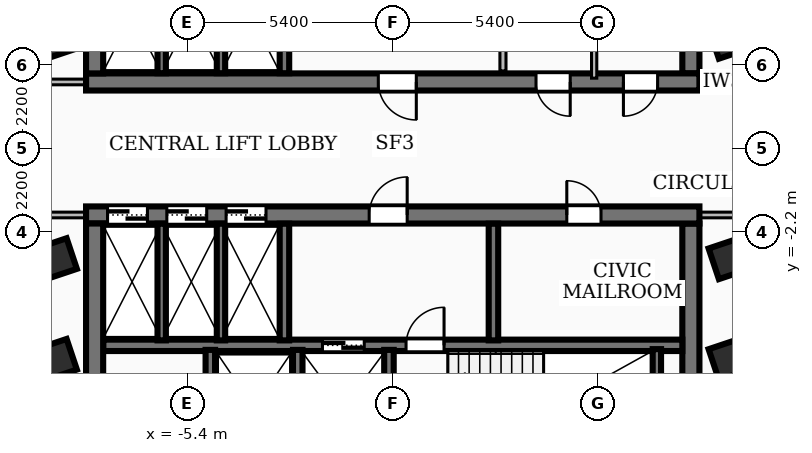
"""IFC4 building model, lengths in metres.
Left out: names, types, materials, properties, quantities, classifications, styles, units other than length and angle.
Written with IfcOpenShell. Run it as: python <this file> out.ifc"""

import sys

from ifc_helpers import new_model, si_unit, direction, frame, frame_2d, origin, origin_2d, place, context, subcontext, project, spatial, rectangle, extrude, element, fill, save


model = new_model("IFC4")
c1 = context("Model", 3, precision=1e-05, world=origin(), true_north=direction((0.0, 1.0)))
c2 = subcontext(c1, "Body", "Model", "MODEL_VIEW")
j1 = project(units=[si_unit("LENGTHUNIT", "METRE"), si_unit("PLANEANGLEUNIT", "RADIAN")], contexts=[c1])
p1 = place(None, origin())
s1 = spatial("IfcSite", under=j1, at=p1, CompositionType="ELEMENT")
p2 = place(p1, origin())
s2 = spatial("IfcBuilding", under=s1, at=p2, CompositionType="ELEMENT")
p3 = place(p2, frame((0.0, 0.0, 159.48)))
s3 = spatial("IfcBuildingStorey", under=s2, at=p3, CompositionType="ELEMENT", Elevation=159.48)
p4 = place(p3, frame((8.07, 1.75, 0.0), z_axis=(0.0, 0.0, 1.0), x_axis=(-1.0, 0.0, 0.0)))
e1 = element("IfcWall", 1, at=p4, inside=s3, PredefinedType="SHEAR", context=c2, shape_type="SweptSolid", body=[
    extrude(rectangle(XDim=16.14, YDim=0.45, at=frame_2d((8.07, 0.0))), origin(), (0.0, 0.0, 1.0), 3.34),
])
p5 = place(p4, frame((7.45, 0.0, 0.0)))
e2 = element("IfcOpeningElement", 2, at=p5, cuts=e1, PredefinedType="OPENING", context=c2, shape_type="SweptSolid", body=[
    extrude(rectangle(XDim=1.0, YDim=2.1, at=frame_2d((0.5, 1.05))), frame((0.0, 0.235, 0.0), z_axis=(0.0, -1.0, 0.0), x_axis=(1.0, 0.0, 0.0)), (0.0, 0.0, 1.0), 0.47),
])
p6 = place(p4, frame((3.4, 0.0, 0.0)))
e3 = element("IfcOpeningElement", 3, at=p6, cuts=e1, PredefinedType="OPENING", context=c2, shape_type="SweptSolid", body=[
    extrude(rectangle(XDim=0.9, YDim=2.06, at=frame_2d((0.45, 1.03))), frame((0.0, 0.235, 0.0), z_axis=(0.0, -1.0, 0.0), x_axis=(1.0, 0.0, 0.0)), (0.0, 0.0, 1.0), 0.47),
])
p7 = place(p4, frame((1.1, 0.0, 0.0)))
e4 = element("IfcOpeningElement", 4, at=p7, cuts=e1, PredefinedType="OPENING", context=c2, shape_type="SweptSolid", body=[
    extrude(rectangle(XDim=0.9, YDim=2.06, at=frame_2d((0.45, 1.03))), frame((0.0, 0.235, 0.0), z_axis=(0.0, -1.0, 0.0), x_axis=(1.0, 0.0, 0.0)), (0.0, 0.0, 1.0), 0.47),
])
for number, where, z_axis, x_axis in (
    (5, (-7.845, 1.975, 0.0), (0.0, 0.0, 1.0), (0.0, 1.0, 0.0)),
    (6, (7.845, 8.31, 0.0), (0.0, 0.0, 1.0), (0.0, -1.0, 0.0)),
):
    element("IfcWall", number, at=place(p3, frame(where, z_axis=z_axis, x_axis=x_axis)), inside=s3, PredefinedType="SHEAR", context=c2, shape_type="SweptSolid", body=[
        extrude(rectangle(XDim=6.335, YDim=0.45, at=frame_2d((3.167, 0.0))), origin(), (0.0, 0.0, 1.0), 3.34),
    ])
p8 = place(p3, frame((-8.07, -1.75, 0.0), z_axis=(0.0, 0.0, 1.0), x_axis=(1.0, 0.0, 0.0)))
e7 = element("IfcWall", 7, at=p8, inside=s3, PredefinedType="SHEAR", context=c2, shape_type="SweptSolid", body=[
    extrude(rectangle(XDim=16.14, YDim=0.45, at=frame_2d((8.07, 0.0))), origin(), (0.0, 0.0, 1.0), 3.34),
])
p9 = place(p8, frame((7.45, 0.0, 0.0)))
e8 = element("IfcOpeningElement", 8, at=p9, cuts=e7, PredefinedType="OPENING", context=c2, shape_type="SweptSolid", body=[
    extrude(rectangle(XDim=1.0, YDim=2.1, at=frame_2d((0.5, 1.05))), frame((0.0, 0.235, 0.0), z_axis=(0.0, -1.0, 0.0), x_axis=(1.0, 0.0, 0.0)), (0.0, 0.0, 1.0), 0.47),
])
p10 = place(p8, frame((12.65, 0.0, 0.0)))
e9 = element("IfcOpeningElement", 9, at=p10, cuts=e7, PredefinedType="OPENING", context=c2, shape_type="SweptSolid", body=[
    extrude(rectangle(XDim=0.9, YDim=2.06, at=frame_2d((0.45, 1.03))), frame((0.0, 0.235, 0.0), z_axis=(0.0, -1.0, 0.0), x_axis=(1.0, 0.0, 0.0)), (0.0, 0.0, 1.0), 0.47),
])
p11 = place(p8, frame((0.565, 0.0, 0.0)))
e10 = element("IfcOpeningElement", 10, at=p11, cuts=e7, PredefinedType="OPENING", context=c2, shape_type="SweptSolid", body=[
    extrude(rectangle(XDim=1.05, YDim=2.15, at=frame_2d((0.525, 1.075))), frame((0.0, 0.235, 0.0), z_axis=(0.0, -1.0, 0.0), x_axis=(1.0, 0.0, 0.0)), (0.0, 0.0, 1.0), 0.47),
])
p12 = place(p8, frame((2.125, 0.0, 0.0)))
e11 = element("IfcOpeningElement", 11, at=p12, cuts=e7, PredefinedType="OPENING", context=c2, shape_type="SweptSolid", body=[
    extrude(rectangle(XDim=1.05, YDim=2.15, at=frame_2d((0.525, 1.075))), frame((0.0, 0.235, 0.0), z_axis=(0.0, -1.0, 0.0), x_axis=(1.0, 0.0, 0.0)), (0.0, 0.0, 1.0), 0.47),
])
p13 = place(p8, frame((3.685, 0.0, 0.0)))
e12 = element("IfcOpeningElement", 12, at=p13, cuts=e7, PredefinedType="OPENING", context=c2, shape_type="SweptSolid", body=[
    extrude(rectangle(XDim=1.05, YDim=2.15, at=frame_2d((0.525, 1.075))), frame((0.0, 0.235, 0.0), z_axis=(0.0, -1.0, 0.0), x_axis=(1.0, 0.0, 0.0)), (0.0, 0.0, 1.0), 0.47),
])
for number, where, z_axis, x_axis in (
    (13, (-7.845, -8.31, 0.0), (0.0, 0.0, 1.0), (0.0, 1.0, 0.0)),
    (14, (7.845, -1.975, 0.0), (0.0, 0.0, 1.0), (0.0, -1.0, 0.0)),
):
    element("IfcWall", number, at=place(p3, frame(where, z_axis=z_axis, x_axis=x_axis)), inside=s3, PredefinedType="SHEAR", context=c2, shape_type="SweptSolid", body=[
        extrude(rectangle(XDim=6.335, YDim=0.45, at=frame_2d((3.167, 0.0))), origin(), (0.0, 0.0, 1.0), 3.34),
    ])
p14 = place(p3, frame((-7.62, -5.18, 0.0), z_axis=(0.0, 0.0, 1.0), x_axis=(1.0, 0.0, 0.0)))
e15 = element("IfcWall", 15, at=p14, inside=s3, PredefinedType="SOLIDWALL", context=c2, shape_type="SweptSolid", body=[
    extrude(rectangle(XDim=15.24, YDim=0.3, at=frame_2d((7.62, 0.0))), origin(), (0.0, 0.0, 1.0), 3.34),
])
p15 = place(p14, frame((5.77, 0.0, 0.0)))
e16 = element("IfcOpeningElement", 16, at=p15, cuts=e15, PredefinedType="OPENING", context=c2, shape_type="SweptSolid", body=[
    extrude(rectangle(XDim=1.1, YDim=2.15, at=frame_2d((0.55, 1.075))), frame((0.0, 0.16, 0.0), z_axis=(0.0, -1.0, 0.0), x_axis=(1.0, 0.0, 0.0)), (0.0, 0.0, 1.0), 0.32),
])
p16 = place(p14, frame((7.97, 0.0, 0.0)))
e17 = element("IfcOpeningElement", 17, at=p16, cuts=e15, PredefinedType="OPENING", context=c2, shape_type="SweptSolid", body=[
    extrude(rectangle(XDim=1.0, YDim=2.1, at=frame_2d((0.5, 1.05))), frame((0.0, 0.16, 0.0), z_axis=(0.0, -1.0, 0.0), x_axis=(1.0, 0.0, 0.0)), (0.0, 0.0, 1.0), 0.32),
])
p17 = place(p3, frame((6.95, -8.34, 0.0), z_axis=(0.0, 0.0, 1.0), x_axis=(0.0, 1.0, 0.0)))
e18 = element("IfcWall", 18, at=p17, inside=s3, PredefinedType="SOLIDWALL", context=c2, shape_type="SweptSolid", body=[
    extrude(rectangle(XDim=3.06, YDim=0.22, at=frame_2d((1.53, 0.0))), origin(), (0.0, 0.0, 1.0), 3.34),
])
p18 = place(p3, frame((-2.85, 1.98, 0.0), z_axis=(0.0, 0.0, 1.0), x_axis=(0.0, 1.0, 0.0)))
e19 = element("IfcWall", 19, at=p18, inside=s3, PredefinedType="SOLIDWALL", context=c2, shape_type="SweptSolid", body=[
    extrude(rectangle(XDim=3.07, YDim=0.25, at=frame_2d((1.535, 0.0))), origin(), (0.0, 0.0, 1.0), 3.34),
])
for number, where, z_axis, x_axis in (
    (20, (-0.1, -8.34, 0.0), (0.0, 0.0, 1.0), (0.0, 1.0, 0.0)),
    (21, (-2.5, -8.34, 0.0), (0.0, 0.0, 1.0), (0.0, 1.0, 0.0)),
    (22, (-4.8, -8.34, 0.0), (0.0, 0.0, 1.0), (0.0, 1.0, 0.0)),
):
    element("IfcWall", number, at=place(p3, frame(where, z_axis=z_axis, x_axis=x_axis)), inside=s3, PredefinedType="SOLIDWALL", context=c2, shape_type="SweptSolid", body=[
        extrude(rectangle(XDim=3.04, YDim=0.25, at=frame_2d((1.52, 0.0))), origin(), (0.0, 0.0, 1.0), 3.34),
    ])
for number, where, z_axis, x_axis in (
    (23, (-2.85, -5.05, 0.0), (0.0, 0.0, 1.0), (0.0, 1.0, 0.0)),
    (24, (2.65, -5.05, 0.0), (0.0, 0.0, 1.0), (0.0, 1.0, 0.0)),
):
    element("IfcWall", number, at=place(p3, frame(where, z_axis=z_axis, x_axis=x_axis)), inside=s3, PredefinedType="SOLIDWALL", context=c2, shape_type="SweptSolid", body=[
        extrude(rectangle(XDim=3.07, YDim=0.25, at=frame_2d((1.535, 0.0))), origin(), (0.0, 0.0, 1.0), 3.34),
    ])
for number, where, z_axis, x_axis in (
    (25, (-6.08, 1.98, 0.0), (0.0, 0.0, 1.0), (0.0, 1.0, 0.0)),
    (26, (-4.52, 1.98, 0.0), (0.0, 0.0, 1.0), (0.0, 1.0, 0.0)),
    (27, (-6.08, -5.05, 0.0), (0.0, 0.0, 1.0), (0.0, 1.0, 0.0)),
    (28, (-4.52, -5.05, 0.0), (0.0, 0.0, 1.0), (0.0, 1.0, 0.0)),
):
    element("IfcWall", number, at=place(p3, frame(where, z_axis=z_axis, x_axis=x_axis)), inside=s3, PredefinedType="SOLIDWALL", context=c2, shape_type="SweptSolid", body=[
        extrude(rectangle(XDim=3.07, YDim=0.22, at=frame_2d((1.535, 0.0))), origin(), (0.0, 0.0, 1.0), 3.34),
    ])
for number, where, z_axis, x_axis in (
    (29, (-8.85, -5.55, 0.0), (0.0, 0.0, 1.0), (0.948, 0.317, 0.0)),
    (30, (-8.85, -2.9, 0.0), (0.0, 0.0, 1.0), (0.948, 0.317, 0.0)),
    (31, (-8.85, 2.9, 0.0), (0.0, 0.0, 1.0), (0.948, 0.317, 0.0)),
    (32, (8.85, -5.55, 0.0), (0.0, 0.0, 1.0), (0.948, 0.317, 0.0)),
    (33, (8.85, -2.9, 0.0), (0.0, 0.0, 1.0), (0.948, 0.317, 0.0)),
    (34, (8.85, 2.9, 0.0), (0.0, 0.0, 1.0), (0.948, 0.317, 0.0)),
):
    element("IfcColumn", number, at=place(p3, frame(where, z_axis=z_axis, x_axis=x_axis)), inside=s3, PredefinedType="COLUMN", context=c2, shape_type="SweptSolid", body=[
        extrude(rectangle(XDim=0.85, YDim=0.85, at=origin_2d()), origin(), (0.0, 0.0, 1.0), 3.6),
    ])
p19 = place(p3, frame((2.9, 2.04, 0.0), z_axis=(0.0, 0.0, 1.0), x_axis=(0.0, 1.0, 0.0)))
e35 = element("IfcWall", 35, at=p19, inside=s3, PredefinedType="PARTITIONING", context=c2, shape_type="SweptSolid", body=[
    extrude(rectangle(XDim=2.94, YDim=0.16, at=frame_2d((1.47, 0.0))), origin(), (0.0, 0.0, 1.0), 2.57),
])
p20 = place(p19, frame((1.82, 0.0, 0.0)))
e36 = element("IfcOpeningElement", 36, at=p20, cuts=e35, PredefinedType="OPENING", context=c2, shape_type="SweptSolid", body=[
    extrude(rectangle(XDim=0.9, YDim=2.06, at=frame_2d((0.45, 1.03))), frame((0.0, 0.09, 0.0), z_axis=(0.0, -1.0, 0.0), x_axis=(1.0, 0.0, 0.0)), (0.0, 0.0, 1.0), 0.18),
])
p21 = place(p3, frame((5.3, 1.85, 0.0), z_axis=(0.0, 0.0, 1.0), x_axis=(0.0, 1.0, 0.0)))
e37 = element("IfcWall", 37, at=p21, inside=s3, PredefinedType="PARTITIONING", context=c2, shape_type="SweptSolid", body=[
    extrude(rectangle(XDim=1.89, YDim=0.138, at=frame_2d((0.945, 0.0))), origin(), (0.0, 0.0, 1.0), 2.57),
])
for number, where, z_axis, x_axis in (
    (38, (-7.85, 1.75, 0.0), (0.0, 0.0, 1.0), (-1.0, 0.0, 0.0)),
    (39, (-7.85, -1.75, 0.0), (0.0, 0.0, 1.0), (-1.0, 0.0, 0.0)),
    (40, (7.85, 1.75, 0.0), (0.0, 0.0, 1.0), (1.0, 0.0, 0.0)),
    (41, (7.85, -1.75, 0.0), (0.0, 0.0, 1.0), (1.0, 0.0, 0.0)),
):
    element("IfcWall", number, at=place(p3, frame(where, z_axis=z_axis, x_axis=x_axis)), inside=s3, PredefinedType="PARTITIONING", context=c2, shape_type="SweptSolid", body=[
        extrude(rectangle(XDim=1.67, YDim=0.15, at=frame_2d((0.835, 0.0))), origin(), (0.0, 0.0, 1.0), 2.57),
    ])
p22 = place(p5, origin())
e42 = element("IfcDoor", 42, at=p22, inside=s3, OperationType="SINGLE_SWING_LEFT", PredefinedType="DOOR", context=c2, shape_type="SweptSolid", body=[
    extrude(rectangle(XDim=1.0, YDim=2.1, at=frame_2d((0.5, 1.05))), frame((0.0, 0.025, 0.0), z_axis=(0.0, -1.0, 0.0), x_axis=(1.0, 0.0, 0.0)), (0.0, 0.0, 1.0), 0.05),
])
fill(e2, e42)
p23 = place(p9, origin())
e43 = element("IfcDoor", 43, at=p23, inside=s3, OperationType="SINGLE_SWING_RIGHT", PredefinedType="DOOR", context=c2, shape_type="SweptSolid", body=[
    extrude(rectangle(XDim=1.0, YDim=2.1, at=frame_2d((0.5, 1.05))), frame((0.0, 0.025, 0.0), z_axis=(0.0, -1.0, 0.0), x_axis=(1.0, 0.0, 0.0)), (0.0, 0.0, 1.0), 0.05),
])
fill(e8, e43)
p24 = place(p15, origin())
e44 = element("IfcDoor", 44, at=p24, inside=s3, OperationType="DOUBLE_DOOR_SLIDING", PredefinedType="DOOR", context=c2, shape_type="SweptSolid", body=[
    extrude(rectangle(XDim=1.1, YDim=2.15, at=frame_2d((0.55, 1.075))), frame((0.0, 0.025, 0.0), z_axis=(0.0, -1.0, 0.0), x_axis=(1.0, 0.0, 0.0)), (0.0, 0.0, 1.0), 0.05),
])
fill(e16, e44)
p25 = place(p16, origin())
e45 = element("IfcDoor", 45, at=p25, inside=s3, OperationType="SINGLE_SWING_RIGHT", PredefinedType="DOOR", context=c2, shape_type="SweptSolid", body=[
    extrude(rectangle(XDim=1.0, YDim=2.1, at=frame_2d((0.5, 1.05))), frame((0.0, 0.025, 0.0), z_axis=(0.0, -1.0, 0.0), x_axis=(1.0, 0.0, 0.0)), (0.0, 0.0, 1.0), 0.05),
])
fill(e17, e45)
p26 = place(p10, origin())
e46 = element("IfcDoor", 46, at=p26, inside=s3, OperationType="SINGLE_SWING_LEFT", PredefinedType="DOOR", context=c2, shape_type="SweptSolid", body=[
    extrude(rectangle(XDim=0.9, YDim=2.06, at=frame_2d((0.45, 1.03))), frame((0.0, 0.025, 0.0), z_axis=(0.0, -1.0, 0.0), x_axis=(1.0, 0.0, 0.0)), (0.0, 0.0, 1.0), 0.05),
])
fill(e9, e46)
p27 = place(p11, origin())
e47 = element("IfcDoor", 47, at=p27, inside=s3, OperationType="DOUBLE_DOOR_SLIDING", PredefinedType="DOOR", context=c2, shape_type="SweptSolid", body=[
    extrude(rectangle(XDim=1.05, YDim=2.15, at=frame_2d((0.525, 1.075))), frame((0.0, 0.025, 0.0), z_axis=(0.0, -1.0, 0.0), x_axis=(1.0, 0.0, 0.0)), (0.0, 0.0, 1.0), 0.05),
])
fill(e10, e47)
p28 = place(p12, origin())
e48 = element("IfcDoor", 48, at=p28, inside=s3, OperationType="DOUBLE_DOOR_SLIDING", PredefinedType="DOOR", context=c2, shape_type="SweptSolid", body=[
    extrude(rectangle(XDim=1.05, YDim=2.15, at=frame_2d((0.525, 1.075))), frame((0.0, 0.025, 0.0), z_axis=(0.0, -1.0, 0.0), x_axis=(1.0, 0.0, 0.0)), (0.0, 0.0, 1.0), 0.05),
])
fill(e11, e48)
p29 = place(p13, origin())
e49 = element("IfcDoor", 49, at=p29, inside=s3, OperationType="DOUBLE_DOOR_SLIDING", PredefinedType="DOOR", context=c2, shape_type="SweptSolid", body=[
    extrude(rectangle(XDim=1.05, YDim=2.15, at=frame_2d((0.525, 1.075))), frame((0.0, 0.025, 0.0), z_axis=(0.0, -1.0, 0.0), x_axis=(1.0, 0.0, 0.0)), (0.0, 0.0, 1.0), 0.05),
])
fill(e12, e49)
p30 = place(p6, origin())
e50 = element("IfcDoor", 50, at=p30, inside=s3, OperationType="SINGLE_SWING_LEFT", PredefinedType="DOOR", context=c2, shape_type="SweptSolid", body=[
    extrude(rectangle(XDim=0.9, YDim=2.06, at=frame_2d((0.45, 1.03))), frame((0.0, 0.025, 0.0), z_axis=(0.0, -1.0, 0.0), x_axis=(1.0, 0.0, 0.0)), (0.0, 0.0, 1.0), 0.05),
])
fill(e3, e50)
p31 = place(p7, origin())
e51 = element("IfcDoor", 51, at=p31, inside=s3, OperationType="SINGLE_SWING_RIGHT", PredefinedType="DOOR", context=c2, shape_type="SweptSolid", body=[
    extrude(rectangle(XDim=0.9, YDim=2.06, at=frame_2d((0.45, 1.03))), frame((0.0, 0.025, 0.0), z_axis=(0.0, -1.0, 0.0), x_axis=(1.0, 0.0, 0.0)), (0.0, 0.0, 1.0), 0.05),
])
fill(e4, e51)
save(model, sys.argv[1])
